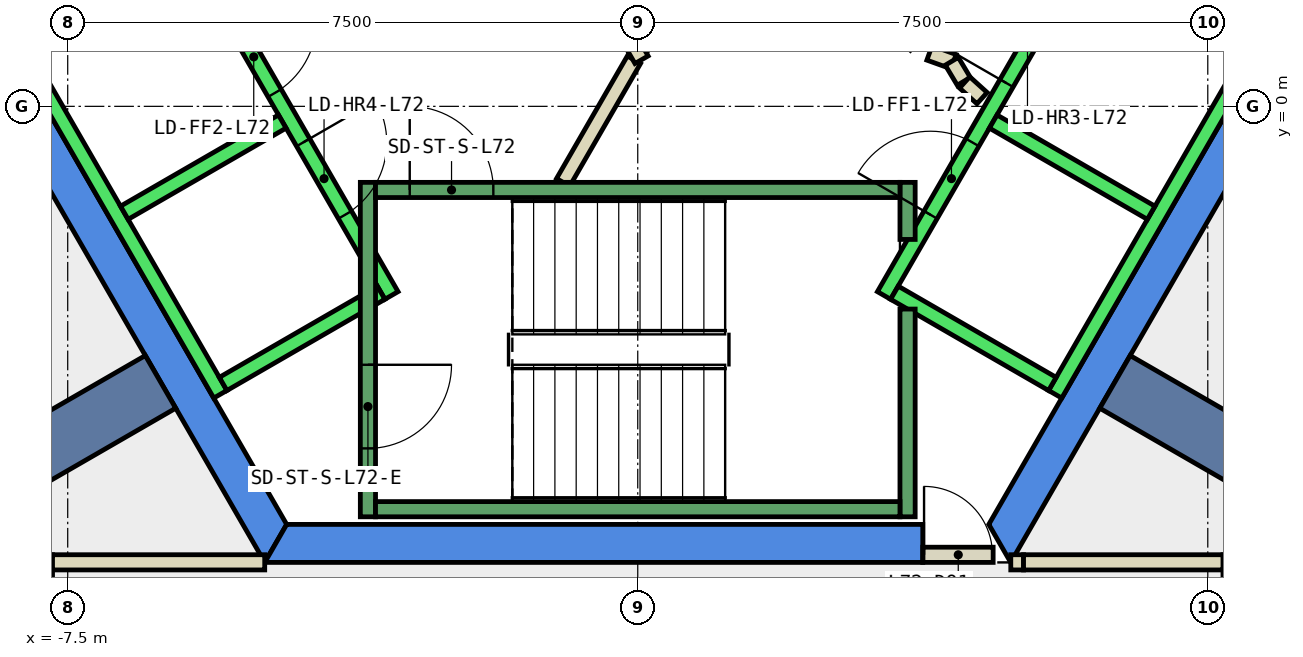
"""IFC4 building model, lengths in metres.
Left out: names, types, materials, properties, quantities, classifications, styles, units other than length and angle.
Written with IfcOpenShell. Run it as: python <this file> out.ifc"""

import sys

from ifc_helpers import new_model, si_unit, direction, frame, frame_2d, origin, place, context, subcontext, project, spatial, polyline, rectangle, outline, extrude, element, fill, save


model = new_model("IFC4")
c1 = context("Model", 3, precision=1e-05, world=origin(), true_north=direction((0.0, 1.0)))
c2 = subcontext(c1, "Body", "Model", "MODEL_VIEW")
j1 = project(units=[si_unit("LENGTHUNIT", "METRE"), si_unit("PLANEANGLEUNIT", "RADIAN")], contexts=[c1])
p1 = place(None, origin())
s1 = spatial("IfcSite", under=j1, at=p1, CompositionType="ELEMENT")
p2 = place(p1, origin())
s2 = spatial("IfcBuilding", under=s1, at=p2, CompositionType="ELEMENT")
p3 = place(p2, frame((0.0, 0.0, 308.0)))
s3 = spatial("IfcBuildingStorey", under=s2, at=p3, CompositionType="ELEMENT", Elevation=308.0)
p4 = place(p3, frame((0.0, 0.0, -0.34)))
e1 = element("IfcWall", 1, at=p4, inside=s3, PredefinedType="SHEAR", context=c2, shape_type="SweptSolid", body=[
    extrude(outline(polyline([(-9.815, 2.5), (-4.907, -6.0), (-4.619, -5.5), (-9.238, 2.5), (-9.815, 2.5)])), origin(), (0.0, 0.0, 1.0), 3.6),
])
p5 = place(p3, frame((0.0, 0.0, -0.34)))
e2 = element("IfcWall", 2, at=p5, inside=s3, PredefinedType="SHEAR", context=c2, shape_type="SweptSolid", body=[
    extrude(outline(polyline([(3.75, -6.0), (3.75, -5.5), (-4.619, -5.5), (-4.907, -6.0), (3.75, -6.0)])), origin(), (0.0, 0.0, 1.0), 3.6),
])
p6 = place(p3, frame((0.0, 0.0, -0.34)))
e3 = element("IfcWall", 3, at=p6, inside=s3, PredefinedType="SHEAR", context=c2, shape_type="SweptSolid", body=[
    extrude(outline(polyline([(4.907, -6.0), (9.815, 2.5), (9.238, 2.5), (4.619, -5.5), (4.907, -6.0)])), origin(), (0.0, 0.0, 1.0), 3.6),
])
for number, where, z_axis, x_axis in (
    (4, (6.279, -3.625, -0.34), (0.0, 0.0, 1.0), (0.866, -0.5, 0.0)),
    (5, (-6.279, -3.625, -0.34), (0.0, 0.0, 1.0), (-0.866, -0.5, 0.0)),
):
    element("IfcWall", number, at=place(p3, frame(where, z_axis=z_axis, x_axis=x_axis)), inside=s3, PredefinedType="SHEAR", context=c2, shape_type="SweptSolid", body=[
        extrude(rectangle(XDim=9.0, YDim=0.8, at=frame_2d((4.5, 0.0))), origin(), (0.0, 0.0, 1.0), 3.6),
    ])
p7 = place(p3, frame((-0.982, -1.0, 0.0), z_axis=(0.0, 0.0, 1.0), x_axis=(0.50024047865, 0.865886518847, 0.0)))
e6 = element("IfcWall", 6, at=p7, inside=s3, PredefinedType="PARTITIONING", context=c2, shape_type="SweptSolid", body=[
    extrude(rectangle(XDim=1.863, YDim=0.2, at=frame_2d((0.931, 0.0))), origin(), (0.0, 0.0, 1.0), 3.26),
])
p8 = place(p3, frame((3.838, 0.702, 0.0), z_axis=(0.0, 0.0, 1.0), x_axis=(0.941035081519, -0.338308993895, 0.0)))
e7 = element("IfcWall", 7, at=p8, inside=s3, PredefinedType="PARTITIONING", context=c2, shape_type="SweptSolid", body=[
    extrude(rectangle(XDim=0.337, YDim=0.2, at=frame_2d((0.168, 0.0))), origin(), (0.0, 0.0, 1.0), 3.26),
])
p9 = place(p3, frame((4.132, 0.593, 0.0), z_axis=(0.0, 0.0, 1.0), x_axis=(0.513561617048, -0.858052717201, 0.0)))
e8 = element("IfcWall", 8, at=p9, inside=s3, PredefinedType="PARTITIONING", context=c2, shape_type="SweptSolid", body=[
    extrude(rectangle(XDim=0.308, YDim=0.2, at=frame_2d((0.154, 0.0))), origin(), (0.0, 0.0, 1.0), 3.26),
])
p10 = place(p3, frame((4.301, 0.315, 0.0), z_axis=(0.0, 0.0, 1.0), x_axis=(0.741798017506, -0.670623367639, 0.0)))
e9 = element("IfcWall", 9, at=p10, inside=s3, PredefinedType="PARTITIONING", context=c2, shape_type="SweptSolid", body=[
    extrude(rectangle(XDim=0.309, YDim=0.2, at=frame_2d((0.154, 0.0))), origin(), (0.0, 0.0, 1.0), 3.26),
])
p11 = place(p3, frame((-2.54, 5.1, 0.0), z_axis=(0.0, 0.0, 1.0), x_axis=(0.499925051871, -0.866068670783, 0.0)))
e10 = element("IfcWall", 10, at=p11, inside=s3, PredefinedType="PARTITIONING", context=c2, shape_type="SweptSolid", body=[
    extrude(rectangle(XDim=5.181, YDim=0.2, at=frame_2d((2.59, 0.0))), origin(), (0.0, 0.0, 1.0), 3.26),
])
p12 = place(p11, frame((1.64, 0.0, 0.0)))
e11 = element("IfcOpeningElement", 11, at=p12, cuts=e10, PredefinedType="OPENING", context=c2, shape_type="SweptSolid", body=[
    extrude(rectangle(XDim=1.0, YDim=2.1, at=frame_2d((0.5, 1.05))), frame((0.0, 0.11, 0.0), z_axis=(0.0, -1.0, 0.0), x_axis=(1.0, 0.0, 0.0)), (0.0, 0.0, 1.0), 0.22),
])
p13 = place(p3, frame((4.908, -5.999, 0.0), z_axis=(0.0, 0.0, 1.0), x_axis=(1.0, 0.0, 0.0)))
e12 = element("IfcWall", 12, at=p13, inside=s3, PredefinedType="PARTITIONING", context=c2, shape_type="SweptSolid", body=[
    extrude(rectangle(XDim=0.168, YDim=0.2, at=frame_2d((0.084, 0.0))), origin(), (0.0, 0.0, 1.0), 2.4),
])
for number, where, z_axis, x_axis in (
    (13, (7.8, -5.899, 0.0), (0.0, 0.0, 1.0), (0.0, -1.0, 0.0)),
    (14, (-7.8, -10.741, 0.0), (0.0, 0.0, 1.0), (0.0, 1.0, 0.0)),
):
    element("IfcWall", number, at=place(p3, frame(where, z_axis=z_axis, x_axis=x_axis)), inside=s3, PredefinedType="PARTITIONING", context=c2, shape_type="SweptSolid", body=[
        extrude(rectangle(XDim=4.842, YDim=0.2, at=frame_2d((2.421, 0.0))), origin(), (0.0, 0.0, 1.0), 3.26),
    ])
p14 = place(p3, frame((-7.7, -5.999, 0.0), z_axis=(0.0, 0.0, 1.0), x_axis=(1.0, 0.0, 0.0)))
e15 = element("IfcWall", 15, at=p14, inside=s3, PredefinedType="PARTITIONING", context=c2, shape_type="SweptSolid", body=[
    extrude(rectangle(XDim=2.792, YDim=0.2, at=frame_2d((1.396, 0.0))), origin(), (0.0, 0.0, 1.0), 3.26),
])
p15 = place(p3, frame((3.75, -5.9, 0.0), z_axis=(0.0, 0.0, 1.0), x_axis=(1.0, 0.0, 0.0)))
e16 = element("IfcWall", 16, at=p15, inside=s3, PredefinedType="PARTITIONING", context=c2, shape_type="SweptSolid", body=[
    extrude(rectangle(XDim=0.926, YDim=0.2, at=frame_2d((0.463, 0.0))), origin(), (0.0, 0.0, 1.0), 2.4),
])
p16 = place(p15, frame((0.017, 0.0, 0.0)))
e17 = element("IfcOpeningElement", 17, at=p16, cuts=e16, PredefinedType="OPENING", context=c2, shape_type="SweptSolid", body=[
    extrude(rectangle(XDim=0.9, YDim=2.1, at=frame_2d((0.45, 1.05))), frame((0.0, 0.11, 0.0), z_axis=(0.0, -1.0, 0.0), x_axis=(1.0, 0.0, 0.0)), (0.0, 0.0, 1.0), 0.22),
])
p17 = place(p3, frame((5.076, -5.999, 0.0), z_axis=(0.0, 0.0, 1.0), x_axis=(1.0, 0.0, 0.0)))
e18 = element("IfcWall", 18, at=p17, inside=s3, PredefinedType="PARTITIONING", context=c2, shape_type="SweptSolid", body=[
    extrude(rectangle(XDim=2.624, YDim=0.2, at=frame_2d((1.312, 0.0))), origin(), (0.0, 0.0, 1.0), 3.26),
])
p18 = place(p3, frame((-5.94, 2.188, 0.0), z_axis=(0.0, 0.0, 1.0), x_axis=(0.500034260056, -0.866005622828, 0.0)))
e19 = element("IfcWall", 19, at=p18, inside=s3, PredefinedType="STANDARD", context=c2, shape_type="SweptSolid", body=[
    extrude(rectangle(XDim=5.399, YDim=0.2, at=frame_2d((2.7, 0.0))), origin(), (0.0, 0.0, 1.0), 3.26),
])
p19 = place(p18, frame((3.075, 0.0, 0.0)))
e20 = element("IfcOpeningElement", 20, at=p19, cuts=e19, PredefinedType="OPENING", context=c2, shape_type="SweptSolid", body=[
    extrude(rectangle(XDim=1.1, YDim=2.1, at=frame_2d((0.55, 1.05))), frame((0.0, 0.11, 0.0), z_axis=(0.0, -1.0, 0.0), x_axis=(1.0, 0.0, 0.0)), (0.0, 0.0, 1.0), 0.22),
])
p20 = place(p18, frame((1.225, 0.0, 0.0)))
e21 = element("IfcOpeningElement", 21, at=p20, cuts=e19, PredefinedType="OPENING", context=c2, shape_type="SweptSolid", body=[
    extrude(rectangle(XDim=1.1, YDim=2.1, at=frame_2d((0.55, 1.05))), frame((0.0, 0.11, 0.0), z_axis=(0.0, -1.0, 0.0), x_axis=(1.0, 0.0, 0.0)), (0.0, 0.0, 1.0), 0.22),
])
p21 = place(p3, frame((-8.192, 0.888, 0.0), z_axis=(0.0, 0.0, 1.0), x_axis=(0.500034260056, -0.866005622828, 0.0)))
e22 = element("IfcWall", 22, at=p21, inside=s3, PredefinedType="STANDARD", context=c2, shape_type="SweptSolid", body=[
    extrude(rectangle(XDim=5.399, YDim=0.2, at=frame_2d((2.7, 0.0))), origin(), (0.0, 0.0, 1.0), 3.26),
])
p22 = place(p3, frame((-4.677, -0.2, 0.0), z_axis=(0.0, 0.0, 1.0), x_axis=(-0.865973769406, -0.500089422704, 0.0)))
e23 = element("IfcWall", 23, at=p22, inside=s3, PredefinedType="STANDARD", context=c2, shape_type="SweptSolid", body=[
    extrude(rectangle(XDim=2.399, YDim=0.2, at=frame_2d((1.2, 0.0))), origin(), (0.0, 0.0, 1.0), 3.26),
])
p23 = place(p3, frame((-3.377, -2.452, 0.0), z_axis=(0.0, 0.0, 1.0), x_axis=(-0.865955154139, -0.50012165622, 0.0)))
e24 = element("IfcWall", 24, at=p23, inside=s3, PredefinedType="STANDARD", context=c2, shape_type="SweptSolid", body=[
    extrude(rectangle(XDim=2.4, YDim=0.2, at=frame_2d((1.2, 0.0))), origin(), (0.0, 0.0, 1.0), 3.26),
])
p24 = place(p3, frame((3.24, -2.488, 0.0), z_axis=(0.0, 0.0, 1.0), x_axis=(0.500034260056, 0.866005622828, 0.0)))
e25 = element("IfcWall", 25, at=p24, inside=s3, PredefinedType="STANDARD", context=c2, shape_type="SweptSolid", body=[
    extrude(rectangle(XDim=5.399, YDim=0.2, at=frame_2d((2.7, 0.0))), origin(), (0.0, 0.0, 1.0), 3.26),
])
p25 = place(p24, frame((3.225, 0.0, 0.0)))
e26 = element("IfcOpeningElement", 26, at=p25, cuts=e25, PredefinedType="OPENING", context=c2, shape_type="SweptSolid", body=[
    extrude(rectangle(XDim=1.1, YDim=2.1, at=frame_2d((0.55, 1.05))), frame((0.0, 0.11, 0.0), z_axis=(0.0, -1.0, 0.0), x_axis=(1.0, 0.0, 0.0)), (0.0, 0.0, 1.0), 0.22),
])
p26 = place(p24, frame((1.225, 0.0, 0.0)))
e27 = element("IfcOpeningElement", 27, at=p26, cuts=e25, PredefinedType="OPENING", context=c2, shape_type="SweptSolid", body=[
    extrude(rectangle(XDim=1.1, YDim=2.1, at=frame_2d((0.55, 1.05))), frame((0.0, 0.11, 0.0), z_axis=(0.0, -1.0, 0.0), x_axis=(1.0, 0.0, 0.0)), (0.0, 0.0, 1.0), 0.22),
])
p27 = place(p3, frame((5.492, -3.788, 0.0), z_axis=(0.0, 0.0, 1.0), x_axis=(0.500034260056, 0.866005622828, 0.0)))
e28 = element("IfcWall", 28, at=p27, inside=s3, PredefinedType="STANDARD", context=c2, shape_type="SweptSolid", body=[
    extrude(rectangle(XDim=5.399, YDim=0.2, at=frame_2d((2.7, 0.0))), origin(), (0.0, 0.0, 1.0), 3.26),
])
p28 = place(p3, frame((3.377, -2.452, 0.0), z_axis=(0.0, 0.0, 1.0), x_axis=(0.865955154139, -0.50012165622, 0.0)))
e29 = element("IfcWall", 29, at=p28, inside=s3, PredefinedType="STANDARD", context=c2, shape_type="SweptSolid", body=[
    extrude(rectangle(XDim=2.4, YDim=0.2, at=frame_2d((1.2, 0.0))), origin(), (0.0, 0.0, 1.0), 3.26),
])
p29 = place(p3, frame((4.677, -0.2, 0.0), z_axis=(0.0, 0.0, 1.0), x_axis=(0.865973769406, -0.500089422704, 0.0)))
e30 = element("IfcWall", 30, at=p29, inside=s3, PredefinedType="STANDARD", context=c2, shape_type="SweptSolid", body=[
    extrude(rectangle(XDim=2.399, YDim=0.2, at=frame_2d((1.2, 0.0))), origin(), (0.0, 0.0, 1.0), 3.26),
])
p30 = place(p3, frame((-3.55, -1.0, 0.0), z_axis=(0.0, 0.0, 1.0), x_axis=(0.0, -1.0, 0.0)))
e31 = element("IfcWall", 31, at=p30, inside=s3, PredefinedType="STANDARD", context=c2, shape_type="SweptSolid", body=[
    extrude(rectangle(XDim=4.4, YDim=0.2, at=frame_2d((2.2, 0.0))), origin(), (0.0, 0.0, 1.0), 3.26),
])
p31 = place(p30, frame((2.4, 0.0, 0.0)))
e32 = element("IfcOpeningElement", 32, at=p31, cuts=e31, PredefinedType="OPENING", context=c2, shape_type="SweptSolid", body=[
    extrude(rectangle(XDim=1.1, YDim=2.2, at=frame_2d((0.55, 1.1))), frame((0.0, 0.11, 0.0), z_axis=(0.0, -1.0, 0.0), x_axis=(1.0, 0.0, 0.0)), (0.0, 0.0, 1.0), 0.22),
])
p32 = place(p3, frame((3.55, -2.667, 0.0), z_axis=(0.0, 0.0, 1.0), x_axis=(0.0, -1.0, 0.0)))
e33 = element("IfcWall", 33, at=p32, inside=s3, PredefinedType="STANDARD", context=c2, shape_type="SweptSolid", body=[
    extrude(rectangle(XDim=2.733, YDim=0.2, at=frame_2d((1.366, 0.0))), origin(), (0.0, 0.0, 1.0), 3.26),
])
p33 = place(p3, frame((3.55, -1.0, 0.0), z_axis=(0.0, 0.0, 1.0), x_axis=(0.0, -1.0, 0.0)))
e34 = element("IfcWall", 34, at=p33, inside=s3, PredefinedType="STANDARD", context=c2, shape_type="SweptSolid", body=[
    extrude(rectangle(XDim=0.751, YDim=0.2, at=frame_2d((0.375, 0.0))), origin(), (0.0, 0.0, 1.0), 3.26),
])
p34 = place(p3, frame((-3.45, -1.1, 0.0), z_axis=(0.0, 0.0, 1.0), x_axis=(1.0, 0.0, 0.0)))
e35 = element("IfcWall", 35, at=p34, inside=s3, PredefinedType="STANDARD", context=c2, shape_type="SweptSolid", body=[
    extrude(rectangle(XDim=6.9, YDim=0.2, at=frame_2d((3.45, 0.0))), origin(), (0.0, 0.0, 1.0), 3.26),
])
p35 = place(p34, frame((0.45, 0.0, 0.0)))
e36 = element("IfcOpeningElement", 36, at=p35, cuts=e35, PredefinedType="OPENING", context=c2, shape_type="SweptSolid", body=[
    extrude(rectangle(XDim=1.1, YDim=2.2, at=frame_2d((0.55, 1.1))), frame((0.0, 0.11, 0.0), z_axis=(0.0, -1.0, 0.0), x_axis=(1.0, 0.0, 0.0)), (0.0, 0.0, 1.0), 0.22),
])
p36 = place(p3, frame((-3.45, -5.3, 0.0), z_axis=(0.0, 0.0, 1.0), x_axis=(1.0, 0.0, 0.0)))
e37 = element("IfcWall", 37, at=p36, inside=s3, PredefinedType="STANDARD", context=c2, shape_type="SweptSolid", body=[
    extrude(rectangle(XDim=6.9, YDim=0.2, at=frame_2d((3.45, 0.0))), origin(), (0.0, 0.0, 1.0), 3.26),
])
p37 = place(p16, origin())
e38 = element("IfcDoor", 38, at=p37, inside=s3, OperationType="SINGLE_SWING_LEFT", PredefinedType="DOOR", context=c2, shape_type="SweptSolid", body=[
    extrude(rectangle(XDim=0.9, YDim=2.1, at=frame_2d((0.45, 1.05))), frame((0.0, 0.025, 0.0), z_axis=(0.0, -1.0, 0.0), x_axis=(1.0, 0.0, 0.0)), (0.0, 0.0, 1.0), 0.05),
])
fill(e17, e38)
p38 = place(p25, origin())
e39 = element("IfcDoor", 39, at=p38, inside=s3, OperationType="SLIDING_TO_LEFT", PredefinedType="DOOR", context=c2, shape_type="SweptSolid", body=[
    extrude(rectangle(XDim=1.1, YDim=2.1, at=frame_2d((0.55, 1.05))), frame((0.0, 0.025, 0.0), z_axis=(0.0, -1.0, 0.0), x_axis=(1.0, 0.0, 0.0)), (0.0, 0.0, 1.0), 0.05),
])
fill(e26, e39)
p39 = place(p19, origin())
e40 = element("IfcDoor", 40, at=p39, inside=s3, OperationType="SLIDING_TO_LEFT", PredefinedType="DOOR", context=c2, shape_type="SweptSolid", body=[
    extrude(rectangle(XDim=1.1, YDim=2.1, at=frame_2d((0.55, 1.05))), frame((0.0, 0.025, 0.0), z_axis=(0.0, -1.0, 0.0), x_axis=(1.0, 0.0, 0.0)), (0.0, 0.0, 1.0), 0.05),
])
fill(e20, e40)
p40 = place(p26, origin())
e41 = element("IfcDoor", 41, at=p40, inside=s3, OperationType="SLIDING_TO_LEFT", PredefinedType="DOOR", context=c2, shape_type="SweptSolid", body=[
    extrude(rectangle(XDim=1.1, YDim=2.1, at=frame_2d((0.55, 1.05))), frame((0.0, 0.025, 0.0), z_axis=(0.0, -1.0, 0.0), x_axis=(1.0, 0.0, 0.0)), (0.0, 0.0, 1.0), 0.05),
])
fill(e27, e41)
p41 = place(p20, origin())
e42 = element("IfcDoor", 42, at=p41, inside=s3, OperationType="SLIDING_TO_LEFT", PredefinedType="DOOR", context=c2, shape_type="SweptSolid", body=[
    extrude(rectangle(XDim=1.1, YDim=2.1, at=frame_2d((0.55, 1.05))), frame((0.0, 0.025, 0.0), z_axis=(0.0, -1.0, 0.0), x_axis=(1.0, 0.0, 0.0)), (0.0, 0.0, 1.0), 0.05),
])
fill(e21, e42)
p42 = place(p35, origin())
e43 = element("IfcDoor", 43, at=p42, inside=s3, OperationType="SINGLE_SWING_LEFT", PredefinedType="DOOR", context=c2, shape_type="SweptSolid", body=[
    extrude(rectangle(XDim=1.1, YDim=2.2, at=frame_2d((0.55, 1.1))), frame((0.0, 0.025, 0.0), z_axis=(0.0, -1.0, 0.0), x_axis=(1.0, 0.0, 0.0)), (0.0, 0.0, 1.0), 0.05),
])
fill(e36, e43)
p43 = place(p31, origin())
e44 = element("IfcDoor", 44, at=p43, inside=s3, OperationType="SINGLE_SWING_LEFT", PredefinedType="DOOR", context=c2, shape_type="SweptSolid", body=[
    extrude(rectangle(XDim=1.1, YDim=2.2, at=frame_2d((0.55, 1.1))), frame((0.0, 0.025, 0.0), z_axis=(0.0, -1.0, 0.0), x_axis=(1.0, 0.0, 0.0)), (0.0, 0.0, 1.0), 0.05),
])
fill(e32, e44)
save(model, sys.argv[1])
